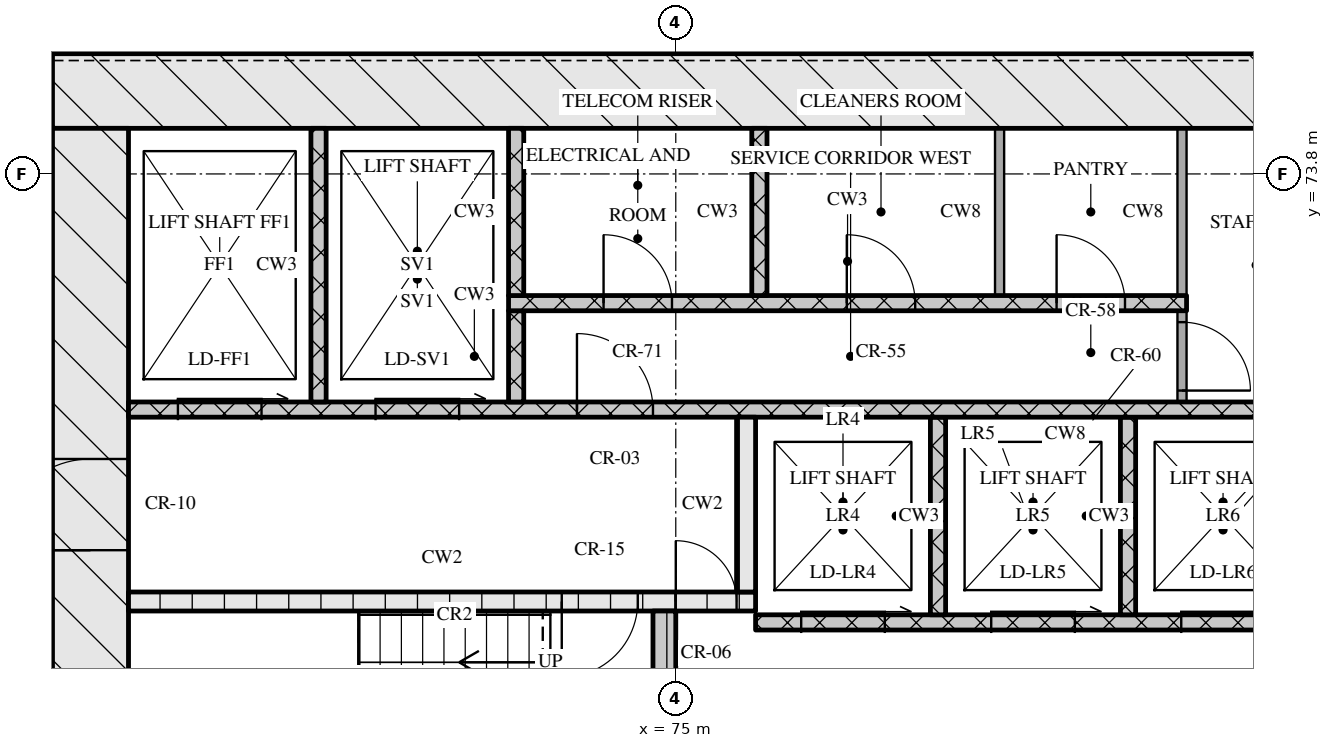
"""IFC4 building model, lengths in metres.
Left out: names, types, materials, properties, quantities, classifications, styles, units other than length and angle.
Written with IfcOpenShell. Run it as: python <this file> out.ifc"""

import sys

from ifc_helpers import new_model, si_unit, direction, frame, frame_2d, origin, place, context, subcontext, project, spatial, rectangle, extrude, element, fill, save


model = new_model("IFC4")
c1 = context("Model", 3, precision=1e-05, world=origin(), true_north=direction((0.0, 1.0)))
c2 = subcontext(c1, "Body", "Model", "MODEL_VIEW")
j1 = project(units=[si_unit("LENGTHUNIT", "METRE"), si_unit("PLANEANGLEUNIT", "RADIAN")], contexts=[c1])
p1 = place(None, origin())
s1 = spatial("IfcSite", under=j1, at=p1, CompositionType="ELEMENT")
p2 = place(p1, origin())
s2 = spatial("IfcBuilding", under=s1, at=p2, CompositionType="ELEMENT")
p3 = place(p2, frame((0.0, 0.0, 98.85)))
s3 = spatial("IfcBuildingStorey", under=s2, at=p3, CompositionType="ELEMENT", Elevation=98.85)
p4 = place(p3, frame((66.8, 74.9, 0.0), z_axis=(0.0, 0.0, 1.0), x_axis=(1.0, 0.0, 0.0)))
e1 = element("IfcWall", 1, at=p4, inside=s3, PredefinedType="SOLIDWALL", context=c2, shape_type="SweptSolid", body=[
    extrude(rectangle(XDim=41.6, YDim=1.0, at=frame_2d((20.8, 0.0))), origin(), (0.0, 0.0, 1.0), 3.32),
])
p5 = place(p3, frame((67.3, 62.4, 0.0), z_axis=(0.0, 0.0, 1.0), x_axis=(0.0, 1.0, 0.0)))
e2 = element("IfcWall", 2, at=p5, inside=s3, PredefinedType="SOLIDWALL", context=c2, shape_type="SweptSolid", body=[
    extrude(rectangle(XDim=12.0, YDim=1.0, at=frame_2d((6.0, 0.0))), origin(), (0.0, 0.0, 1.0), 3.32),
])
p6 = place(p5, frame((6.45, 0.0, 0.0)))
e3 = element("IfcOpeningElement", 3, at=p6, cuts=e2, PredefinedType="OPENING", context=c2, shape_type="SweptSolid", body=[
    extrude(rectangle(XDim=1.2, YDim=2.1, at=frame_2d((0.6, 1.05))), frame((0.0, 0.51, 0.0), z_axis=(0.0, -1.0, 0.0), x_axis=(1.0, 0.0, 0.0)), (0.0, 0.0, 1.0), 1.02),
])
p7 = place(p3, frame((74.85, 65.2, 0.0), z_axis=(0.0, 0.0, 1.0), x_axis=(0.0, 1.0, 0.0)))
e4 = element("IfcWall", 4, at=p7, inside=s3, PredefinedType="SOLIDWALL", context=c2, shape_type="SweptSolid", body=[
    extrude(rectangle(XDim=2.85, YDim=0.3, at=frame_2d((1.425, 0.0))), origin(), (0.0, 0.0, 1.0), 3.32),
])
p8 = place(p3, frame((76.05, 67.9, 0.0), z_axis=(0.0, 0.0, 1.0), x_axis=(1.0, 0.0, 0.0)))
e5 = element("IfcWall", 5, at=p8, inside=s3, PredefinedType="SOLIDWALL", context=c2, shape_type="SweptSolid", body=[
    extrude(rectangle(XDim=23.1, YDim=0.2, at=frame_2d((11.55, 0.0))), origin(), (0.0, 0.0, 1.0), 3.32),
])
p9 = place(p8, frame((0.6, 0.0, 0.0)))
e6 = element("IfcOpeningElement", 6, at=p9, cuts=e5, PredefinedType="OPENING", context=c2, shape_type="SweptSolid", body=[
    extrude(rectangle(XDim=1.1, YDim=2.1, at=frame_2d((0.55, 1.05))), frame((0.0, 0.11, 0.0), z_axis=(0.0, -1.0, 0.0), x_axis=(1.0, 0.0, 0.0)), (0.0, 0.0, 1.0), 0.22),
])
p10 = place(p8, frame((3.1, 0.0, 0.0)))
e7 = element("IfcOpeningElement", 7, at=p10, cuts=e5, PredefinedType="OPENING", context=c2, shape_type="SweptSolid", body=[
    extrude(rectangle(XDim=1.1, YDim=2.1, at=frame_2d((0.55, 1.05))), frame((0.0, 0.11, 0.0), z_axis=(0.0, -1.0, 0.0), x_axis=(1.0, 0.0, 0.0)), (0.0, 0.0, 1.0), 0.22),
])
p11 = place(p8, frame((5.6, 0.0, 0.0)))
e8 = element("IfcOpeningElement", 8, at=p11, cuts=e5, PredefinedType="OPENING", context=c2, shape_type="SweptSolid", body=[
    extrude(rectangle(XDim=1.1, YDim=2.1, at=frame_2d((0.55, 1.05))), frame((0.0, 0.11, 0.0), z_axis=(0.0, -1.0, 0.0), x_axis=(1.0, 0.0, 0.0)), (0.0, 0.0, 1.0), 0.22),
])
p12 = place(p8, frame((8.45, 0.0, 0.0)))
e9 = element("IfcOpeningElement", 9, at=p12, cuts=e5, PredefinedType="OPENING", context=c2, shape_type="SweptSolid", body=[
    extrude(rectangle(XDim=0.9, YDim=2.1, at=frame_2d((0.45, 1.05))), frame((0.0, 0.11, 0.0), z_axis=(0.0, -1.0, 0.0), x_axis=(1.0, 0.0, 0.0)), (0.0, 0.0, 1.0), 0.22),
])
p13 = place(p8, frame((10.91, 0.0, 0.0)))
e10 = element("IfcOpeningElement", 10, at=p13, cuts=e5, PredefinedType="OPENING", context=c2, shape_type="SweptSolid", body=[
    extrude(rectangle(XDim=0.9, YDim=2.1, at=frame_2d((0.45, 1.05))), frame((0.0, 0.11, 0.0), z_axis=(0.0, -1.0, 0.0), x_axis=(1.0, 0.0, 0.0)), (0.0, 0.0, 1.0), 0.22),
])
p14 = place(p8, frame((13.55, 0.0, 0.0)))
e11 = element("IfcOpeningElement", 11, at=p14, cuts=e5, PredefinedType="OPENING", context=c2, shape_type="SweptSolid", body=[
    extrude(rectangle(XDim=1.0, YDim=2.1, at=frame_2d((0.5, 1.05))), frame((0.0, 0.11, 0.0), z_axis=(0.0, -1.0, 0.0), x_axis=(1.0, 0.0, 0.0)), (0.0, 0.0, 1.0), 0.22),
])
for number, where, z_axis, x_axis in (
    (12, (78.45, 68.0, 0.0), (0.0, 0.0, 1.0), (0.0, 1.0, 0.0)),
    (13, (80.95, 68.0, 0.0), (0.0, 0.0, 1.0), (0.0, 1.0, 0.0)),
):
    element("IfcWall", number, at=place(p3, frame(where, z_axis=z_axis, x_axis=x_axis)), inside=s3, PredefinedType="SOLIDWALL", context=c2, shape_type="SweptSolid", body=[
        extrude(rectangle(XDim=2.6, YDim=0.2, at=frame_2d((1.3, 0.0))), origin(), (0.0, 0.0, 1.0), 3.32),
    ])
p15 = place(p3, frame((67.8, 68.175, 0.0), z_axis=(0.0, 0.0, 1.0), x_axis=(1.0, 0.0, 0.0)))
e14 = element("IfcWall", 14, at=p15, inside=s3, PredefinedType="SOLIDWALL", context=c2, shape_type="SweptSolid", body=[
    extrude(rectangle(XDim=8.25, YDim=0.25, at=frame_2d((4.125, 0.0))), origin(), (0.0, 0.0, 1.0), 3.32),
])
p16 = place(p15, frame((5.7, 0.0, 0.0)))
e15 = element("IfcOpeningElement", 15, at=p16, cuts=e14, PredefinedType="OPENING", context=c2, shape_type="SweptSolid", body=[
    extrude(rectangle(XDim=1.0, YDim=2.1, at=frame_2d((0.5, 1.05))), frame((0.0, 0.135, 0.0), z_axis=(0.0, -1.0, 0.0), x_axis=(1.0, 0.0, 0.0)), (0.0, 0.0, 1.0), 0.27),
])
p17 = place(p15, frame((7.2, 0.0, 0.0)))
e16 = element("IfcOpeningElement", 16, at=p17, cuts=e14, PredefinedType="OPENING", context=c2, shape_type="SweptSolid", body=[
    extrude(rectangle(XDim=0.8, YDim=2.1, at=frame_2d((0.4, 1.05))), frame((0.0, 0.135, 0.0), z_axis=(0.0, -1.0, 0.0), x_axis=(1.0, 0.0, 0.0)), (0.0, 0.0, 1.0), 0.27),
])
p18 = place(p3, frame((75.925, 68.3, 0.0), z_axis=(0.0, 0.0, 1.0), x_axis=(0.0, 1.0, 0.0)))
e17 = element("IfcWall", 17, at=p18, inside=s3, PredefinedType="SOLIDWALL", context=c2, shape_type="SweptSolid", body=[
    extrude(rectangle(XDim=2.3, YDim=0.25, at=frame_2d((1.15, 0.0))), origin(), (0.0, 0.0, 1.0), 3.32),
])
p19 = place(p3, frame((67.8, 70.7, 0.0), z_axis=(0.0, 0.0, 1.0), x_axis=(1.0, 0.0, 0.0)))
e18 = element("IfcWall", 18, at=p19, inside=s3, PredefinedType="SOLIDWALL", context=c2, shape_type="SweptSolid", body=[
    extrude(rectangle(XDim=39.6, YDim=0.2, at=frame_2d((19.8, 0.0))), origin(), (0.0, 0.0, 1.0), 3.32),
])
p20 = place(p19, frame((0.65, 0.0, 0.0)))
e19 = element("IfcOpeningElement", 19, at=p20, cuts=e18, PredefinedType="OPENING", context=c2, shape_type="SweptSolid", body=[
    extrude(rectangle(XDim=1.1, YDim=2.1, at=frame_2d((0.55, 1.05))), frame((0.0, 0.11, 0.0), z_axis=(0.0, -1.0, 0.0), x_axis=(1.0, 0.0, 0.0)), (0.0, 0.0, 1.0), 0.22),
])
p21 = place(p19, frame((3.25, 0.0, 0.0)))
e20 = element("IfcOpeningElement", 20, at=p21, cuts=e18, PredefinedType="OPENING", context=c2, shape_type="SweptSolid", body=[
    extrude(rectangle(XDim=1.1, YDim=2.1, at=frame_2d((0.55, 1.05))), frame((0.0, 0.11, 0.0), z_axis=(0.0, -1.0, 0.0), x_axis=(1.0, 0.0, 0.0)), (0.0, 0.0, 1.0), 0.22),
])
p22 = place(p19, frame((5.9, 0.0, 0.0)))
e21 = element("IfcOpeningElement", 21, at=p22, cuts=e18, PredefinedType="OPENING", context=c2, shape_type="SweptSolid", body=[
    extrude(rectangle(XDim=1.0, YDim=2.1, at=frame_2d((0.5, 1.05))), frame((0.0, 0.11, 0.0), z_axis=(0.0, -1.0, 0.0), x_axis=(1.0, 0.0, 0.0)), (0.0, 0.0, 1.0), 0.22),
])
p23 = place(p19, frame((21.7, 0.0, 0.0)))
e22 = element("IfcOpeningElement", 22, at=p23, cuts=e18, PredefinedType="OPENING", context=c2, shape_type="SweptSolid", body=[
    extrude(rectangle(XDim=1.0, YDim=2.1, at=frame_2d((0.5, 1.05))), frame((0.0, 0.11, 0.0), z_axis=(0.0, -1.0, 0.0), x_axis=(1.0, 0.0, 0.0)), (0.0, 0.0, 1.0), 0.22),
])
p24 = place(p19, frame((32.7, 0.0, 0.0)))
e23 = element("IfcOpeningElement", 23, at=p24, cuts=e18, PredefinedType="OPENING", context=c2, shape_type="SweptSolid", body=[
    extrude(rectangle(XDim=1.0, YDim=2.1, at=frame_2d((0.5, 1.05))), frame((0.0, 0.11, 0.0), z_axis=(0.0, -1.0, 0.0), x_axis=(1.0, 0.0, 0.0)), (0.0, 0.0, 1.0), 0.22),
])
p25 = place(p19, frame((35.25, 0.0, 0.0)))
e24 = element("IfcOpeningElement", 24, at=p25, cuts=e18, PredefinedType="OPENING", context=c2, shape_type="SweptSolid", body=[
    extrude(rectangle(XDim=1.1, YDim=2.1, at=frame_2d((0.55, 1.05))), frame((0.0, 0.11, 0.0), z_axis=(0.0, -1.0, 0.0), x_axis=(1.0, 0.0, 0.0)), (0.0, 0.0, 1.0), 0.22),
])
p26 = place(p19, frame((37.85, 0.0, 0.0)))
e25 = element("IfcOpeningElement", 25, at=p26, cuts=e18, PredefinedType="OPENING", context=c2, shape_type="SweptSolid", body=[
    extrude(rectangle(XDim=1.1, YDim=2.1, at=frame_2d((0.55, 1.05))), frame((0.0, 0.11, 0.0), z_axis=(0.0, -1.0, 0.0), x_axis=(1.0, 0.0, 0.0)), (0.0, 0.0, 1.0), 0.22),
])
p27 = place(p3, frame((70.3, 70.8, 0.0), z_axis=(0.0, 0.0, 1.0), x_axis=(0.0, 1.0, 0.0)))
e26 = element("IfcWall", 26, at=p27, inside=s3, PredefinedType="SOLIDWALL", context=c2, shape_type="SweptSolid", body=[
    extrude(rectangle(XDim=3.6, YDim=0.2, at=frame_2d((1.8, 0.0))), origin(), (0.0, 0.0, 1.0), 3.32),
])
p28 = place(p3, frame((72.9, 70.8, 0.0), z_axis=(0.0, 0.0, 1.0), x_axis=(0.0, 1.0, 0.0)))
e27 = element("IfcWall", 27, at=p28, inside=s3, PredefinedType="SOLIDWALL", context=c2, shape_type="SweptSolid", body=[
    extrude(rectangle(XDim=1.2, YDim=0.2, at=frame_2d((0.6, 0.0))), origin(), (0.0, 0.0, 1.0), 3.32),
])
p29 = place(p3, frame((81.66, 70.8, 0.0), z_axis=(0.0, 0.0, 1.0), x_axis=(0.0, 1.0, 0.0)))
e28 = element("IfcWall", 28, at=p29, inside=s3, PredefinedType="PARTITIONING", context=c2, shape_type="SweptSolid", body=[
    extrude(rectangle(XDim=1.2, YDim=0.12, at=frame_2d((0.6, 0.0))), origin(), (0.0, 0.0, 1.0), 3.32),
])
p30 = place(p29, frame((0.15, 0.0, 0.0)))
e29 = element("IfcOpeningElement", 29, at=p30, cuts=e28, PredefinedType="OPENING", context=c2, shape_type="SweptSolid", body=[
    extrude(rectangle(XDim=0.9, YDim=2.1, at=frame_2d((0.45, 1.05))), frame((0.0, 0.07, 0.0), z_axis=(0.0, -1.0, 0.0), x_axis=(1.0, 0.0, 0.0)), (0.0, 0.0, 1.0), 0.14),
])
p31 = place(p3, frame((72.8, 72.1, 0.0), z_axis=(0.0, 0.0, 1.0), x_axis=(1.0, 0.0, 0.0)))
e30 = element("IfcWall", 30, at=p31, inside=s3, PredefinedType="SOLIDWALL", context=c2, shape_type="SweptSolid", body=[
    extrude(rectangle(XDim=8.92, YDim=0.2, at=frame_2d((4.46, 0.0))), origin(), (0.0, 0.0, 1.0), 3.32),
])
p32 = place(p31, frame((1.25, 0.0, 0.0)))
e31 = element("IfcOpeningElement", 31, at=p32, cuts=e30, PredefinedType="OPENING", context=c2, shape_type="SweptSolid", body=[
    extrude(rectangle(XDim=0.9, YDim=2.1, at=frame_2d((0.45, 1.05))), frame((0.0, 0.11, 0.0), z_axis=(0.0, -1.0, 0.0), x_axis=(1.0, 0.0, 0.0)), (0.0, 0.0, 1.0), 0.22),
])
p33 = place(p31, frame((4.45, 0.0, 0.0)))
e32 = element("IfcOpeningElement", 32, at=p33, cuts=e30, PredefinedType="OPENING", context=c2, shape_type="SweptSolid", body=[
    extrude(rectangle(XDim=0.9, YDim=2.1, at=frame_2d((0.45, 1.05))), frame((0.0, 0.11, 0.0), z_axis=(0.0, -1.0, 0.0), x_axis=(1.0, 0.0, 0.0)), (0.0, 0.0, 1.0), 0.22),
])
p34 = place(p31, frame((7.21, 0.0, 0.0)))
e33 = element("IfcOpeningElement", 33, at=p34, cuts=e30, PredefinedType="OPENING", context=c2, shape_type="SweptSolid", body=[
    extrude(rectangle(XDim=0.9, YDim=2.1, at=frame_2d((0.45, 1.05))), frame((0.0, 0.11, 0.0), z_axis=(0.0, -1.0, 0.0), x_axis=(1.0, 0.0, 0.0)), (0.0, 0.0, 1.0), 0.22),
])
for number, where, z_axis, x_axis in (
    (34, (72.9, 72.2, 0.0), (0.0, 0.0, 1.0), (0.0, 1.0, 0.0)),
    (35, (76.1, 72.2, 0.0), (0.0, 0.0, 1.0), (0.0, 1.0, 0.0)),
):
    element("IfcWall", number, at=place(p3, frame(where, z_axis=z_axis, x_axis=x_axis)), inside=s3, PredefinedType="SOLIDWALL", context=c2, shape_type="SweptSolid", body=[
        extrude(rectangle(XDim=2.2, YDim=0.2, at=frame_2d((1.1, 0.0))), origin(), (0.0, 0.0, 1.0), 3.32),
    ])
for number, where, z_axis, x_axis in (
    (36, (79.26, 72.2, 0.0), (0.0, 0.0, 1.0), (0.0, 1.0, 0.0)),
    (37, (81.66, 72.2, 0.0), (0.0, 0.0, 1.0), (0.0, 1.0, 0.0)),
):
    element("IfcWall", number, at=place(p3, frame(where, z_axis=z_axis, x_axis=x_axis)), inside=s3, PredefinedType="PARTITIONING", context=c2, shape_type="SweptSolid", body=[
        extrude(rectangle(XDim=2.2, YDim=0.12, at=frame_2d((1.1, 0.0))), origin(), (0.0, 0.0, 1.0), 3.32),
    ])
p35 = place(p9, origin())
e38 = element("IfcDoor", 38, at=p35, inside=s3, OperationType="SLIDING_TO_RIGHT", PredefinedType="DOOR", context=c2, shape_type="SweptSolid", body=[
    extrude(rectangle(XDim=1.1, YDim=2.1, at=frame_2d((0.55, 1.05))), frame((0.0, 0.025, 0.0), z_axis=(0.0, -1.0, 0.0), x_axis=(1.0, 0.0, 0.0)), (0.0, 0.0, 1.0), 0.05),
])
fill(e6, e38)
p36 = place(p10, origin())
e39 = element("IfcDoor", 39, at=p36, inside=s3, OperationType="SLIDING_TO_RIGHT", PredefinedType="DOOR", context=c2, shape_type="SweptSolid", body=[
    extrude(rectangle(XDim=1.1, YDim=2.1, at=frame_2d((0.55, 1.05))), frame((0.0, 0.025, 0.0), z_axis=(0.0, -1.0, 0.0), x_axis=(1.0, 0.0, 0.0)), (0.0, 0.0, 1.0), 0.05),
])
fill(e7, e39)
p37 = place(p11, origin())
e40 = element("IfcDoor", 40, at=p37, inside=s3, OperationType="SLIDING_TO_RIGHT", PredefinedType="DOOR", context=c2, shape_type="SweptSolid", body=[
    extrude(rectangle(XDim=1.1, YDim=2.1, at=frame_2d((0.55, 1.05))), frame((0.0, 0.025, 0.0), z_axis=(0.0, -1.0, 0.0), x_axis=(1.0, 0.0, 0.0)), (0.0, 0.0, 1.0), 0.05),
])
fill(e8, e40)
p38 = place(p16, origin())
e41 = element("IfcDoor", 41, at=p38, inside=s3, OperationType="SINGLE_SWING_RIGHT", PredefinedType="DOOR", context=c2, shape_type="SweptSolid", body=[
    extrude(rectangle(XDim=1.0, YDim=2.1, at=frame_2d((0.5, 1.05))), frame((0.0, 0.025, 0.0), z_axis=(0.0, -1.0, 0.0), x_axis=(1.0, 0.0, 0.0)), (0.0, 0.0, 1.0), 0.05),
])
fill(e15, e41)
p39 = place(p17, origin())
e42 = element("IfcDoor", 42, at=p39, inside=s3, OperationType="SINGLE_SWING_LEFT", PredefinedType="DOOR", context=c2, shape_type="SweptSolid", body=[
    extrude(rectangle(XDim=0.8, YDim=2.1, at=frame_2d((0.4, 1.05))), frame((0.0, 0.025, 0.0), z_axis=(0.0, -1.0, 0.0), x_axis=(1.0, 0.0, 0.0)), (0.0, 0.0, 1.0), 0.05),
])
fill(e16, e42)
p40 = place(p6, origin())
e43 = element("IfcDoor", 43, at=p40, inside=s3, OperationType="SINGLE_SWING_LEFT", PredefinedType="DOOR", context=c2, shape_type="SweptSolid", body=[
    extrude(rectangle(XDim=1.2, YDim=2.1, at=frame_2d((0.6, 1.05))), frame((0.0, 0.025, 0.0), z_axis=(0.0, -1.0, 0.0), x_axis=(1.0, 0.0, 0.0)), (0.0, 0.0, 1.0), 0.05),
])
fill(e3, e43)
p41 = place(p20, origin())
e44 = element("IfcDoor", 44, at=p41, inside=s3, OperationType="SLIDING_TO_RIGHT", PredefinedType="DOOR", context=c2, shape_type="SweptSolid", body=[
    extrude(rectangle(XDim=1.1, YDim=2.1, at=frame_2d((0.55, 1.05))), frame((0.0, 0.025, 0.0), z_axis=(0.0, -1.0, 0.0), x_axis=(1.0, 0.0, 0.0)), (0.0, 0.0, 1.0), 0.05),
])
fill(e19, e44)
p42 = place(p21, origin())
e45 = element("IfcDoor", 45, at=p42, inside=s3, OperationType="SLIDING_TO_RIGHT", PredefinedType="DOOR", context=c2, shape_type="SweptSolid", body=[
    extrude(rectangle(XDim=1.1, YDim=2.1, at=frame_2d((0.55, 1.05))), frame((0.0, 0.025, 0.0), z_axis=(0.0, -1.0, 0.0), x_axis=(1.0, 0.0, 0.0)), (0.0, 0.0, 1.0), 0.05),
])
fill(e20, e45)
p43 = place(p22, origin())
e46 = element("IfcDoor", 46, at=p43, inside=s3, OperationType="SINGLE_SWING_LEFT", PredefinedType="DOOR", context=c2, shape_type="SweptSolid", body=[
    extrude(rectangle(XDim=1.0, YDim=2.1, at=frame_2d((0.5, 1.05))), frame((0.0, 0.025, 0.0), z_axis=(0.0, -1.0, 0.0), x_axis=(1.0, 0.0, 0.0)), (0.0, 0.0, 1.0), 0.05),
])
fill(e21, e46)
p44 = place(p30, origin())
e47 = element("IfcDoor", 47, at=p44, inside=s3, OperationType="SINGLE_SWING_RIGHT", PredefinedType="DOOR", context=c2, shape_type="SweptSolid", body=[
    extrude(rectangle(XDim=0.9, YDim=2.1, at=frame_2d((0.45, 1.05))), frame((0.0, 0.025, 0.0), z_axis=(0.0, -1.0, 0.0), x_axis=(1.0, 0.0, 0.0)), (0.0, 0.0, 1.0), 0.05),
])
fill(e29, e47)
p45 = place(p32, origin())
e48 = element("IfcDoor", 48, at=p45, inside=s3, OperationType="SINGLE_SWING_LEFT", PredefinedType="DOOR", context=c2, shape_type="SweptSolid", body=[
    extrude(rectangle(XDim=0.9, YDim=2.1, at=frame_2d((0.45, 1.05))), frame((0.0, 0.025, 0.0), z_axis=(0.0, -1.0, 0.0), x_axis=(1.0, 0.0, 0.0)), (0.0, 0.0, 1.0), 0.05),
])
fill(e31, e48)
p46 = place(p33, origin())
e49 = element("IfcDoor", 49, at=p46, inside=s3, OperationType="SINGLE_SWING_LEFT", PredefinedType="DOOR", context=c2, shape_type="SweptSolid", body=[
    extrude(rectangle(XDim=0.9, YDim=2.1, at=frame_2d((0.45, 1.05))), frame((0.0, 0.025, 0.0), z_axis=(0.0, -1.0, 0.0), x_axis=(1.0, 0.0, 0.0)), (0.0, 0.0, 1.0), 0.05),
])
fill(e32, e49)
p47 = place(p34, origin())
e50 = element("IfcDoor", 50, at=p47, inside=s3, OperationType="SINGLE_SWING_LEFT", PredefinedType="DOOR", context=c2, shape_type="SweptSolid", body=[
    extrude(rectangle(XDim=0.9, YDim=2.1, at=frame_2d((0.45, 1.05))), frame((0.0, 0.025, 0.0), z_axis=(0.0, -1.0, 0.0), x_axis=(1.0, 0.0, 0.0)), (0.0, 0.0, 1.0), 0.05),
])
fill(e33, e50)
save(model, sys.argv[1])
